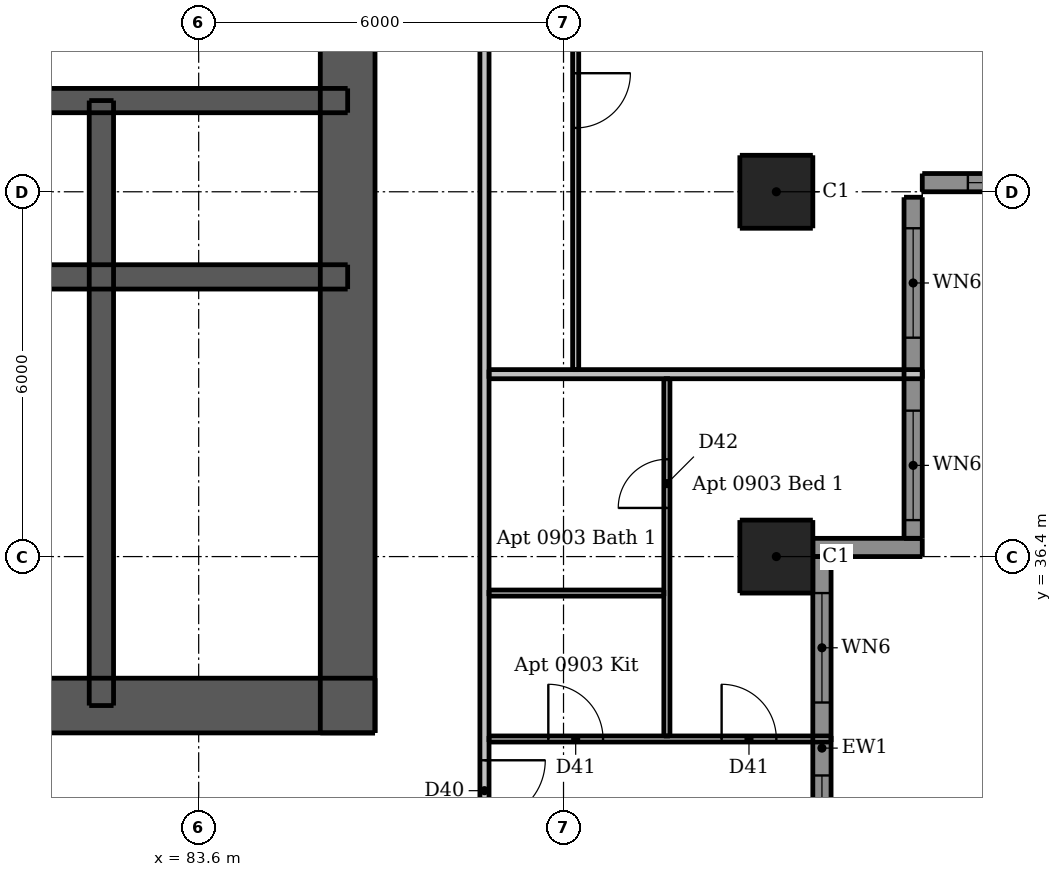
"""IFC4 building model, lengths in metres.
Left out: names, types, materials, properties, quantities, classifications, styles, units other than length and angle.
Written with IfcOpenShell. Run it as: python <this file> out.ifc"""

import sys

from ifc_helpers import new_model, si_unit, direction, frame, frame_2d, origin, origin_2d, place, context, subcontext, project, spatial, rectangle, extrude, element, fill, save


model = new_model("IFC4")
c1 = context("Model", 3, precision=1e-05, world=origin(), true_north=direction((0.0, 1.0)))
c2 = subcontext(c1, "Body", "Model", "MODEL_VIEW")
j1 = project(units=[si_unit("LENGTHUNIT", "METRE"), si_unit("PLANEANGLEUNIT", "RADIAN")], contexts=[c1])
p1 = place(None, origin())
s1 = spatial("IfcSite", under=j1, at=p1, CompositionType="ELEMENT")
p2 = place(p1, origin())
s2 = spatial("IfcBuilding", under=s1, at=p2, CompositionType="ELEMENT")
p3 = place(p2, frame((0.0, 0.0, 36.7)))
s3 = spatial("IfcBuildingStorey", under=s2, at=p3, CompositionType="ELEMENT", Elevation=36.7)
p4 = place(p3, frame((62.5, 33.95, 0.0), z_axis=(0.0, 0.0, 1.0), x_axis=(1.0, 0.0, 0.0)))
e1 = element("IfcWall", 1, at=p4, inside=s3, PredefinedType="SHEAR", context=c2, shape_type="SweptSolid", body=[
    extrude(rectangle(XDim=24.0, YDim=0.9, at=frame_2d((12.0, 0.0))), origin(), (0.0, 0.0, 1.0), 3.05),
])
p5 = place(p4, frame((2.05, 0.0, 0.0)))
e2 = element("IfcOpeningElement", 2, at=p5, cuts=e1, PredefinedType="OPENING", context=c2, shape_type="SweptSolid", body=[
    extrude(rectangle(XDim=1.1, YDim=2.1, at=frame_2d((0.55, 1.05))), frame((0.0, 0.46, 0.0), z_axis=(0.0, -1.0, 0.0), x_axis=(1.0, 0.0, 0.0)), (0.0, 0.0, 1.0), 0.92),
])
p6 = place(p4, frame((20.85, 0.0, 0.0)))
e3 = element("IfcOpeningElement", 3, at=p6, cuts=e1, PredefinedType="OPENING", context=c2, shape_type="SweptSolid", body=[
    extrude(rectangle(XDim=1.1, YDim=2.1, at=frame_2d((0.55, 1.05))), frame((0.0, 0.46, 0.0), z_axis=(0.0, -1.0, 0.0), x_axis=(1.0, 0.0, 0.0)), (0.0, 0.0, 1.0), 0.92),
])
p7 = place(p4, frame((8.0, 0.0, 0.0)))
e4 = element("IfcOpeningElement", 4, at=p7, cuts=e1, PredefinedType="OPENING", context=c2, shape_type="SweptSolid", body=[
    extrude(rectangle(XDim=1.1, YDim=2.1, at=frame_2d((0.55, 1.05))), frame((0.0, 0.46, 0.0), z_axis=(0.0, -1.0, 0.0), x_axis=(1.0, 0.0, 0.0)), (0.0, 0.0, 1.0), 0.92),
])
p8 = place(p4, frame((16.363, 0.0, 0.0)))
e5 = element("IfcOpeningElement", 5, at=p8, cuts=e1, PredefinedType="OPENING", context=c2, shape_type="SweptSolid", body=[
    extrude(rectangle(XDim=0.9, YDim=2.1, at=frame_2d((0.45, 1.05))), frame((0.0, 0.46, 0.0), z_axis=(0.0, -1.0, 0.0), x_axis=(1.0, 0.0, 0.0)), (0.0, 0.0, 1.0), 0.92),
])
p9 = place(p3, frame((86.05, 33.5, 0.0), z_axis=(0.0, 0.0, 1.0), x_axis=(0.0, 1.0, 0.0)))
e6 = element("IfcWall", 6, at=p9, inside=s3, PredefinedType="SHEAR", context=c2, shape_type="SweptSolid", body=[
    extrude(rectangle(XDim=24.0, YDim=0.9, at=frame_2d((12.0, 0.0))), origin(), (0.0, 0.0, 1.0), 3.05),
])
p10 = place(p9, frame((11.2, 0.0, 0.0)))
e7 = element("IfcOpeningElement", 7, at=p10, cuts=e6, PredefinedType="OPENING", context=c2, shape_type="SweptSolid", body=[
    extrude(rectangle(XDim=1.6, YDim=2.1, at=frame_2d((0.8, 1.05))), frame((0.0, 0.46, 0.0), z_axis=(0.0, -1.0, 0.0), x_axis=(1.0, 0.0, 0.0)), (0.0, 0.0, 1.0), 0.92),
])
p11 = place(p3, frame((62.95, 41.0, 0.0), z_axis=(0.0, 0.0, 1.0), x_axis=(1.0, 0.0, 0.0)))
e8 = element("IfcWall", 8, at=p11, inside=s3, PredefinedType="SHEAR", context=c2, shape_type="SweptSolid", body=[
    extrude(rectangle(XDim=23.1, YDim=0.4, at=frame_2d((11.55, 0.0))), origin(), (0.0, 0.0, 1.0), 3.05),
])
p12 = place(p3, frame((62.95, 43.9, 0.0), z_axis=(0.0, 0.0, 1.0), x_axis=(1.0, 0.0, 0.0)))
e9 = element("IfcWall", 9, at=p12, inside=s3, PredefinedType="SHEAR", context=c2, shape_type="SweptSolid", body=[
    extrude(rectangle(XDim=23.1, YDim=0.4, at=frame_2d((11.55, 0.0))), origin(), (0.0, 0.0, 1.0), 3.05),
])
p13 = place(p12, frame((0.85, 0.0, 0.0)))
e10 = element("IfcOpeningElement", 10, at=p13, cuts=e9, PredefinedType="OPENING", context=c2, shape_type="SweptSolid", body=[
    extrude(rectangle(XDim=0.9, YDim=2.1, at=frame_2d((0.45, 1.05))), frame((0.0, 0.21, 0.0), z_axis=(0.0, -1.0, 0.0), x_axis=(1.0, 0.0, 0.0)), (0.0, 0.0, 1.0), 0.42),
])
p14 = place(p12, frame((2.55, 0.0, 0.0)))
e11 = element("IfcOpeningElement", 11, at=p14, cuts=e9, PredefinedType="OPENING", context=c2, shape_type="SweptSolid", body=[
    extrude(rectangle(XDim=0.9, YDim=2.1, at=frame_2d((0.45, 1.05))), frame((0.0, 0.21, 0.0), z_axis=(0.0, -1.0, 0.0), x_axis=(1.0, 0.0, 0.0)), (0.0, 0.0, 1.0), 0.42),
])
p15 = place(p12, frame((20.5, 0.0, 0.0)))
e12 = element("IfcOpeningElement", 12, at=p15, cuts=e9, PredefinedType="OPENING", context=c2, shape_type="SweptSolid", body=[
    extrude(rectangle(XDim=0.9, YDim=2.1, at=frame_2d((0.45, 1.05))), frame((0.0, 0.21, 0.0), z_axis=(0.0, -1.0, 0.0), x_axis=(1.0, 0.0, 0.0)), (0.0, 0.0, 1.0), 0.42),
])
p16 = place(p12, frame((4.75, 0.0, 0.0)))
e13 = element("IfcOpeningElement", 13, at=p16, cuts=e9, PredefinedType="OPENING", context=c2, shape_type="SweptSolid", body=[
    extrude(rectangle(XDim=1.1, YDim=2.1, at=frame_2d((0.55, 1.05))), frame((0.0, 0.21, 0.0), z_axis=(0.0, -1.0, 0.0), x_axis=(1.0, 0.0, 0.0)), (0.0, 0.0, 1.0), 0.42),
])
p17 = place(p12, frame((7.25, 0.0, 0.0)))
e14 = element("IfcOpeningElement", 14, at=p17, cuts=e9, PredefinedType="OPENING", context=c2, shape_type="SweptSolid", body=[
    extrude(rectangle(XDim=1.1, YDim=2.1, at=frame_2d((0.55, 1.05))), frame((0.0, 0.21, 0.0), z_axis=(0.0, -1.0, 0.0), x_axis=(1.0, 0.0, 0.0)), (0.0, 0.0, 1.0), 0.42),
])
p18 = place(p12, frame((9.75, 0.0, 0.0)))
e15 = element("IfcOpeningElement", 15, at=p18, cuts=e9, PredefinedType="OPENING", context=c2, shape_type="SweptSolid", body=[
    extrude(rectangle(XDim=1.1, YDim=2.1, at=frame_2d((0.55, 1.05))), frame((0.0, 0.21, 0.0), z_axis=(0.0, -1.0, 0.0), x_axis=(1.0, 0.0, 0.0)), (0.0, 0.0, 1.0), 0.42),
])
p19 = place(p12, frame((12.25, 0.0, 0.0)))
e16 = element("IfcOpeningElement", 16, at=p19, cuts=e9, PredefinedType="OPENING", context=c2, shape_type="SweptSolid", body=[
    extrude(rectangle(XDim=1.1, YDim=2.1, at=frame_2d((0.55, 1.05))), frame((0.0, 0.21, 0.0), z_axis=(0.0, -1.0, 0.0), x_axis=(1.0, 0.0, 0.0)), (0.0, 0.0, 1.0), 0.42),
])
p20 = place(p12, frame((14.75, 0.0, 0.0)))
e17 = element("IfcOpeningElement", 17, at=p20, cuts=e9, PredefinedType="OPENING", context=c2, shape_type="SweptSolid", body=[
    extrude(rectangle(XDim=1.1, YDim=2.1, at=frame_2d((0.55, 1.05))), frame((0.0, 0.21, 0.0), z_axis=(0.0, -1.0, 0.0), x_axis=(1.0, 0.0, 0.0)), (0.0, 0.0, 1.0), 0.42),
])
p21 = place(p12, frame((17.25, 0.0, 0.0)))
e18 = element("IfcOpeningElement", 18, at=p21, cuts=e9, PredefinedType="OPENING", context=c2, shape_type="SweptSolid", body=[
    extrude(rectangle(XDim=1.1, YDim=2.1, at=frame_2d((0.55, 1.05))), frame((0.0, 0.21, 0.0), z_axis=(0.0, -1.0, 0.0), x_axis=(1.0, 0.0, 0.0)), (0.0, 0.0, 1.0), 0.42),
])
p22 = place(p3, frame((82.0, 33.95, 0.0), z_axis=(0.0, 0.0, 1.0), x_axis=(0.0, 1.0, 0.0)))
e19 = element("IfcWall", 19, at=p22, inside=s3, PredefinedType="SHEAR", context=c2, shape_type="SweptSolid", body=[
    extrude(rectangle(XDim=9.95, YDim=0.4, at=frame_2d((4.975, 0.0))), origin(), (0.0, 0.0, 1.0), 3.05),
])
for number, where, z_axis, x_axis in (
    (20, (93.1, 36.4, 0.0), (0.0, 0.0, 1.0), (1.0, 0.0, 0.0)),
    (21, (93.1, 42.4, 0.0), (0.0, 0.0, 1.0), (1.0, 0.0, 0.0)),
):
    element("IfcColumn", number, at=place(p3, frame(where, z_axis=z_axis, x_axis=x_axis)), inside=s3, PredefinedType="COLUMN", context=c2, shape_type="SweptSolid", body=[
        extrude(rectangle(XDim=1.2, YDim=1.2, at=origin_2d()), origin(), (0.0, 0.0, 1.0), 3.05),
    ])
p23 = place(p3, frame((93.7, 36.55, 0.0), z_axis=(0.0, 0.0, 1.0), x_axis=(1.0, 0.0, 0.0)))
e22 = element("IfcWall", 22, at=p23, inside=s3, PredefinedType="SOLIDWALL", context=c2, shape_type="SweptSolid", body=[
    extrude(rectangle(XDim=1.8, YDim=0.3, at=frame_2d((0.9, 0.0))), origin(), (0.0, 0.0, 1.0), 3.05),
])
p24 = place(p3, frame((95.5, 42.55, 0.0), z_axis=(0.0, 0.0, 1.0), x_axis=(1.0, 0.0, 0.0)))
e23 = element("IfcWall", 23, at=p24, inside=s3, PredefinedType="SOLIDWALL", context=c2, shape_type="SweptSolid", body=[
    extrude(rectangle(XDim=3.0, YDim=0.3, at=frame_2d((1.5, 0.0))), origin(), (0.0, 0.0, 1.0), 3.05),
])
p25 = place(p24, frame((0.75, 0.0, 0.9)))
e24 = element("IfcOpeningElement", 24, at=p25, cuts=e23, PredefinedType="OPENING", context=c2, shape_type="SweptSolid", body=[
    extrude(rectangle(XDim=1.5, YDim=1.5, at=frame_2d((0.75, 0.75))), frame((0.0, 0.16, 0.0), z_axis=(0.0, -1.0, 0.0), x_axis=(1.0, 0.0, 0.0)), (0.0, 0.0, 1.0), 0.32),
])
p26 = place(p3, frame((93.85, 30.1, 0.0), z_axis=(0.0, 0.0, 1.0), x_axis=(0.0, 1.0, 0.0)))
e25 = element("IfcWall", 25, at=p26, inside=s3, PredefinedType="SOLIDWALL", context=c2, shape_type="SweptSolid", body=[
    extrude(rectangle(XDim=6.3, YDim=0.3, at=frame_2d((3.15, 0.0))), origin(), (0.0, 0.0, 1.0), 3.05),
])
p27 = place(p26, frame((0.9, 0.0, 0.15)))
e26 = element("IfcOpeningElement", 26, at=p27, cuts=e25, PredefinedType="OPENING", context=c2, shape_type="SweptSolid", body=[
    extrude(rectangle(XDim=1.8, YDim=2.1, at=frame_2d((0.9, 1.05))), frame((0.0, 0.16, 0.0), z_axis=(0.0, -1.0, 0.0), x_axis=(1.0, 0.0, 0.0)), (0.0, 0.0, 1.0), 0.32),
])
p28 = place(p26, frame((3.9, 0.0, 0.15)))
e27 = element("IfcOpeningElement", 27, at=p28, cuts=e25, PredefinedType="OPENING", context=c2, shape_type="SweptSolid", body=[
    extrude(rectangle(XDim=1.8, YDim=2.1, at=frame_2d((0.9, 1.05))), frame((0.0, 0.16, 0.0), z_axis=(0.0, -1.0, 0.0), x_axis=(1.0, 0.0, 0.0)), (0.0, 0.0, 1.0), 0.32),
])
p29 = place(p3, frame((95.35, 36.7, 0.0), z_axis=(0.0, 0.0, 1.0), x_axis=(0.0, 1.0, 0.0)))
e28 = element("IfcWall", 28, at=p29, inside=s3, PredefinedType="SOLIDWALL", context=c2, shape_type="SweptSolid", body=[
    extrude(rectangle(XDim=5.61, YDim=0.3, at=frame_2d((2.805, 0.0))), origin(), (0.0, 0.0, 1.0), 3.05),
])
p30 = place(p29, frame((0.3, 0.0, 0.15)))
e29 = element("IfcOpeningElement", 29, at=p30, cuts=e28, PredefinedType="OPENING", context=c2, shape_type="SweptSolid", body=[
    extrude(rectangle(XDim=1.8, YDim=2.1, at=frame_2d((0.9, 1.05))), frame((0.0, 0.16, 0.0), z_axis=(0.0, -1.0, 0.0), x_axis=(1.0, 0.0, 0.0)), (0.0, 0.0, 1.0), 0.32),
])
p31 = place(p29, frame((3.3, 0.0, 0.15)))
e30 = element("IfcOpeningElement", 30, at=p31, cuts=e28, PredefinedType="OPENING", context=c2, shape_type="SweptSolid", body=[
    extrude(rectangle(XDim=1.8, YDim=2.1, at=frame_2d((0.9, 1.05))), frame((0.0, 0.16, 0.0), z_axis=(0.0, -1.0, 0.0), x_axis=(1.0, 0.0, 0.0)), (0.0, 0.0, 1.0), 0.32),
])
p32 = place(p3, frame((89.8, 59.35, 0.0), z_axis=(0.0, 0.0, 1.0), x_axis=(0.0, -1.0, 0.0)))
e31 = element("IfcWall", 31, at=p32, inside=s3, PredefinedType="PARTITIONING", context=c2, shape_type="SweptSolid", body=[
    extrude(rectangle(XDim=19.875, YDim=0.1, at=frame_2d((9.938, 0.0))), origin(), (0.0, 0.0, 1.0), 3.05),
])
p33 = place(p32, frame((15.0, 0.0, 0.0)))
e32 = element("IfcOpeningElement", 32, at=p33, cuts=e31, PredefinedType="OPENING", context=c2, shape_type="SweptSolid", body=[
    extrude(rectangle(XDim=0.9, YDim=2.1, at=frame_2d((0.45, 1.05))), frame((0.0, 0.06, 0.0), z_axis=(0.0, -1.0, 0.0), x_axis=(1.0, 0.0, 0.0)), (0.0, 0.0, 1.0), 0.12),
])
p34 = place(p32, frame((9.0, 0.0, 0.0)))
e33 = element("IfcOpeningElement", 33, at=p34, cuts=e31, PredefinedType="OPENING", context=c2, shape_type="SweptSolid", body=[
    extrude(rectangle(XDim=0.9, YDim=2.1, at=frame_2d((0.45, 1.05))), frame((0.0, 0.06, 0.0), z_axis=(0.0, -1.0, 0.0), x_axis=(1.0, 0.0, 0.0)), (0.0, 0.0, 1.0), 0.12),
])
p35 = place(p32, frame((6.0, 0.0, 0.0)))
e34 = element("IfcOpeningElement", 34, at=p35, cuts=e31, PredefinedType="OPENING", context=c2, shape_type="SweptSolid", body=[
    extrude(rectangle(XDim=0.9, YDim=2.1, at=frame_2d((0.45, 1.05))), frame((0.0, 0.06, 0.0), z_axis=(0.0, -1.0, 0.0), x_axis=(1.0, 0.0, 0.0)), (0.0, 0.0, 1.0), 0.12),
])
p36 = place(p32, frame((0.85, 0.0, 0.0)))
e35 = element("IfcOpeningElement", 35, at=p36, cuts=e31, PredefinedType="OPENING", context=c2, shape_type="SweptSolid", body=[
    extrude(rectangle(XDim=0.9, YDim=2.1, at=frame_2d((0.45, 1.05))), frame((0.0, 0.06, 0.0), z_axis=(0.0, -1.0, 0.0), x_axis=(1.0, 0.0, 0.0)), (0.0, 0.0, 1.0), 0.12),
])
p37 = place(p32, frame((3.35, 0.0, 0.0)))
e36 = element("IfcOpeningElement", 36, at=p37, cuts=e31, PredefinedType="OPENING", context=c2, shape_type="SweptSolid", body=[
    extrude(rectangle(XDim=0.8, YDim=2.1, at=frame_2d((0.4, 1.05))), frame((0.0, 0.06, 0.0), z_axis=(0.0, -1.0, 0.0), x_axis=(1.0, 0.0, 0.0)), (0.0, 0.0, 1.0), 0.12),
])
p38 = place(p3, frame((91.3, 33.45, 0.0), z_axis=(0.0, 0.0, 1.0), x_axis=(0.0, 1.0, 0.0)))
e37 = element("IfcWall", 37, at=p38, inside=s3, PredefinedType="PARTITIONING", context=c2, shape_type="SweptSolid", body=[
    extrude(rectangle(XDim=5.875, YDim=0.1, at=frame_2d((2.938, 0.0))), origin(), (0.0, 0.0, 1.0), 3.05),
])
p39 = place(p38, frame((3.75, 0.0, 0.0)))
e38 = element("IfcOpeningElement", 38, at=p39, cuts=e37, PredefinedType="OPENING", context=c2, shape_type="SweptSolid", body=[
    extrude(rectangle(XDim=0.8, YDim=2.1, at=frame_2d((0.4, 1.05))), frame((0.0, 0.06, 0.0), z_axis=(0.0, -1.0, 0.0), x_axis=(1.0, 0.0, 0.0)), (0.0, 0.0, 1.0), 0.12),
])
p40 = place(p3, frame((88.375, 35.8, 0.0), z_axis=(0.0, 0.0, 1.0), x_axis=(1.0, 0.0, 0.0)))
e39 = element("IfcWall", 39, at=p40, inside=s3, PredefinedType="PARTITIONING", context=c2, shape_type="SweptSolid", body=[
    extrude(rectangle(XDim=2.875, YDim=0.1, at=frame_2d((1.438, 0.0))), origin(), (0.0, 0.0, 1.0), 3.05),
])
p41 = place(p3, frame((88.375, 33.4, 0.0), z_axis=(0.0, 0.0, 1.0), x_axis=(1.0, 0.0, 0.0)))
e40 = element("IfcWall", 40, at=p41, inside=s3, PredefinedType="PARTITIONING", context=c2, shape_type="SweptSolid", body=[
    extrude(rectangle(XDim=5.625, YDim=0.1, at=frame_2d((2.812, 0.0))), origin(), (0.0, 0.0, 1.0), 3.05),
])
p42 = place(p41, frame((0.975, 0.0, 0.0)))
e41 = element("IfcOpeningElement", 41, at=p42, cuts=e40, PredefinedType="OPENING", context=c2, shape_type="SweptSolid", body=[
    extrude(rectangle(XDim=0.9, YDim=2.1, at=frame_2d((0.45, 1.05))), frame((0.0, 0.06, 0.0), z_axis=(0.0, -1.0, 0.0), x_axis=(1.0, 0.0, 0.0)), (0.0, 0.0, 1.0), 0.12),
])
p43 = place(p41, frame((3.825, 0.0, 0.0)))
e42 = element("IfcOpeningElement", 42, at=p43, cuts=e40, PredefinedType="OPENING", context=c2, shape_type="SweptSolid", body=[
    extrude(rectangle(XDim=0.9, YDim=2.1, at=frame_2d((0.45, 1.05))), frame((0.0, 0.06, 0.0), z_axis=(0.0, -1.0, 0.0), x_axis=(1.0, 0.0, 0.0)), (0.0, 0.0, 1.0), 0.12),
])
p44 = place(p3, frame((88.3, 60.475, 0.0), z_axis=(0.0, 0.0, 1.0), x_axis=(0.0, -1.0, 0.0)))
e43 = element("IfcWall", 43, at=p44, inside=s3, PredefinedType="PARTITIONING", context=c2, shape_type="SweptSolid", body=[
    extrude(rectangle(XDim=28.7, YDim=0.15, at=frame_2d((14.35, 0.0))), origin(), (0.0, 0.0, 1.0), 3.05),
])
p45 = place(p44, frame((27.425, 0.0, 0.0)))
e44 = element("IfcOpeningElement", 44, at=p45, cuts=e43, PredefinedType="OPENING", context=c2, shape_type="SweptSolid", body=[
    extrude(rectangle(XDim=1.0, YDim=2.1, at=frame_2d((0.5, 1.05))), frame((0.0, 0.085, 0.0), z_axis=(0.0, -1.0, 0.0), x_axis=(1.0, 0.0, 0.0)), (0.0, 0.0, 1.0), 0.17),
])
p46 = place(p44, frame((10.625, 0.0, 0.0)))
e45 = element("IfcOpeningElement", 45, at=p46, cuts=e43, PredefinedType="OPENING", context=c2, shape_type="SweptSolid", body=[
    extrude(rectangle(XDim=1.0, YDim=2.1, at=frame_2d((0.5, 1.05))), frame((0.0, 0.085, 0.0), z_axis=(0.0, -1.0, 0.0), x_axis=(1.0, 0.0, 0.0)), (0.0, 0.0, 1.0), 0.17),
])
p47 = place(p3, frame((88.375, 39.4, 0.0), z_axis=(0.0, 0.0, 1.0), x_axis=(1.0, 0.0, 0.0)))
e46 = element("IfcWall", 46, at=p47, inside=s3, PredefinedType="PARTITIONING", context=c2, shape_type="SweptSolid", body=[
    extrude(rectangle(XDim=7.125, YDim=0.15, at=frame_2d((3.562, 0.0))), origin(), (0.0, 0.0, 1.0), 3.05),
])
p48 = place(p25, origin())
e47 = element("IfcWindow", 47, at=p48, inside=s3, PartitioningType="DOUBLE_PANEL_VERTICAL", PredefinedType="WINDOW", context=c2, shape_type="SweptSolid", body=[
    extrude(rectangle(XDim=1.5, YDim=1.5, at=frame_2d((0.75, 0.75))), frame((0.0, 0.03, 0.0), z_axis=(0.0, -1.0, 0.0), x_axis=(1.0, 0.0, 0.0)), (0.0, 0.0, 1.0), 0.06),
])
fill(e24, e47)
p49 = place(p27, origin())
e48 = element("IfcWindow", 48, at=p49, inside=s3, PartitioningType="DOUBLE_PANEL_VERTICAL", PredefinedType="WINDOW", context=c2, shape_type="SweptSolid", body=[
    extrude(rectangle(XDim=1.8, YDim=2.1, at=frame_2d((0.9, 1.05))), frame((0.0, 0.03, 0.0), z_axis=(0.0, -1.0, 0.0), x_axis=(1.0, 0.0, 0.0)), (0.0, 0.0, 1.0), 0.06),
])
fill(e26, e48)
p50 = place(p28, origin())
e49 = element("IfcWindow", 49, at=p50, inside=s3, PartitioningType="DOUBLE_PANEL_VERTICAL", PredefinedType="WINDOW", context=c2, shape_type="SweptSolid", body=[
    extrude(rectangle(XDim=1.8, YDim=2.1, at=frame_2d((0.9, 1.05))), frame((0.0, 0.03, 0.0), z_axis=(0.0, -1.0, 0.0), x_axis=(1.0, 0.0, 0.0)), (0.0, 0.0, 1.0), 0.06),
])
fill(e27, e49)
p51 = place(p30, origin())
e50 = element("IfcWindow", 50, at=p51, inside=s3, PartitioningType="DOUBLE_PANEL_VERTICAL", PredefinedType="WINDOW", context=c2, shape_type="SweptSolid", body=[
    extrude(rectangle(XDim=1.8, YDim=2.1, at=frame_2d((0.9, 1.05))), frame((0.0, 0.03, 0.0), z_axis=(0.0, -1.0, 0.0), x_axis=(1.0, 0.0, 0.0)), (0.0, 0.0, 1.0), 0.06),
])
fill(e29, e50)
p52 = place(p31, origin())
e51 = element("IfcWindow", 51, at=p52, inside=s3, PartitioningType="DOUBLE_PANEL_VERTICAL", PredefinedType="WINDOW", context=c2, shape_type="SweptSolid", body=[
    extrude(rectangle(XDim=1.8, YDim=2.1, at=frame_2d((0.9, 1.05))), frame((0.0, 0.03, 0.0), z_axis=(0.0, -1.0, 0.0), x_axis=(1.0, 0.0, 0.0)), (0.0, 0.0, 1.0), 0.06),
])
fill(e30, e51)
p53 = place(p6, origin())
e52 = element("IfcDoor", 52, at=p53, inside=s3, OperationType="SINGLE_SWING_RIGHT", PredefinedType="DOOR", context=c2, shape_type="SweptSolid", body=[
    extrude(rectangle(XDim=1.1, YDim=2.1, at=frame_2d((0.55, 1.05))), frame((0.0, 0.438, 0.0), z_axis=(0.0, -1.0, 0.0), x_axis=(1.0, 0.0, 0.0)), (0.0, 0.0, 1.0), 0.05),
])
fill(e3, e52)
p54 = place(p15, origin())
e53 = element("IfcDoor", 53, at=p54, inside=s3, OperationType="SINGLE_SWING_LEFT", PredefinedType="DOOR", context=c2, shape_type="SweptSolid", body=[
    extrude(rectangle(XDim=0.9, YDim=2.1, at=frame_2d((0.45, 1.05))), frame((0.0, -0.138, 0.0), z_axis=(0.0, -1.0, 0.0), x_axis=(1.0, 0.0, 0.0)), (0.0, 0.0, 1.0), 0.05),
])
fill(e12, e53)
p55 = place(p21, origin())
e54 = element("IfcDoor", 54, at=p55, inside=s3, OperationType="DOUBLE_DOOR_SLIDING", PredefinedType="DOOR", context=c2, shape_type="SweptSolid", body=[
    extrude(rectangle(XDim=1.1, YDim=2.1, at=frame_2d((0.55, 1.05))), frame((0.0, 0.025, 0.0), z_axis=(0.0, -1.0, 0.0), x_axis=(1.0, 0.0, 0.0)), (0.0, 0.0, 1.0), 0.05),
])
fill(e18, e54)
p56 = place(p45, origin())
e55 = element("IfcDoor", 55, at=p56, inside=s3, OperationType="SINGLE_SWING_LEFT", PredefinedType="DOOR", context=c2, shape_type="SweptSolid", body=[
    extrude(rectangle(XDim=1.0, YDim=2.1, at=frame_2d((0.5, 1.05))), frame((0.0, 0.025, 0.0), z_axis=(0.0, -1.0, 0.0), x_axis=(1.0, 0.0, 0.0)), (0.0, 0.0, 1.0), 0.05),
])
fill(e44, e55)
p57 = place(p42, origin())
e56 = element("IfcDoor", 56, at=p57, inside=s3, OperationType="SINGLE_SWING_LEFT", PredefinedType="DOOR", context=c2, shape_type="SweptSolid", body=[
    extrude(rectangle(XDim=0.9, YDim=2.1, at=frame_2d((0.45, 1.05))), frame((0.0, 0.025, 0.0), z_axis=(0.0, -1.0, 0.0), x_axis=(1.0, 0.0, 0.0)), (0.0, 0.0, 1.0), 0.05),
])
fill(e41, e56)
p58 = place(p43, origin())
e57 = element("IfcDoor", 57, at=p58, inside=s3, OperationType="SINGLE_SWING_LEFT", PredefinedType="DOOR", context=c2, shape_type="SweptSolid", body=[
    extrude(rectangle(XDim=0.9, YDim=2.1, at=frame_2d((0.45, 1.05))), frame((0.0, 0.025, 0.0), z_axis=(0.0, -1.0, 0.0), x_axis=(1.0, 0.0, 0.0)), (0.0, 0.0, 1.0), 0.05),
])
fill(e42, e57)
p59 = place(p39, origin())
e58 = element("IfcDoor", 58, at=p59, inside=s3, OperationType="SINGLE_SWING_LEFT", PredefinedType="DOOR", context=c2, shape_type="SweptSolid", body=[
    extrude(rectangle(XDim=0.8, YDim=2.1, at=frame_2d((0.4, 1.05))), frame((0.0, 0.025, 0.0), z_axis=(0.0, -1.0, 0.0), x_axis=(1.0, 0.0, 0.0)), (0.0, 0.0, 1.0), 0.05),
])
fill(e38, e58)
p60 = place(p33, origin())
e59 = element("IfcDoor", 59, at=p60, inside=s3, OperationType="SINGLE_SWING_LEFT", PredefinedType="DOOR", context=c2, shape_type="SweptSolid", body=[
    extrude(rectangle(XDim=0.9, YDim=2.1, at=frame_2d((0.45, 1.05))), frame((0.0, 0.025, 0.0), z_axis=(0.0, -1.0, 0.0), x_axis=(1.0, 0.0, 0.0)), (0.0, 0.0, 1.0), 0.05),
])
fill(e32, e59)
save(model, sys.argv[1])
